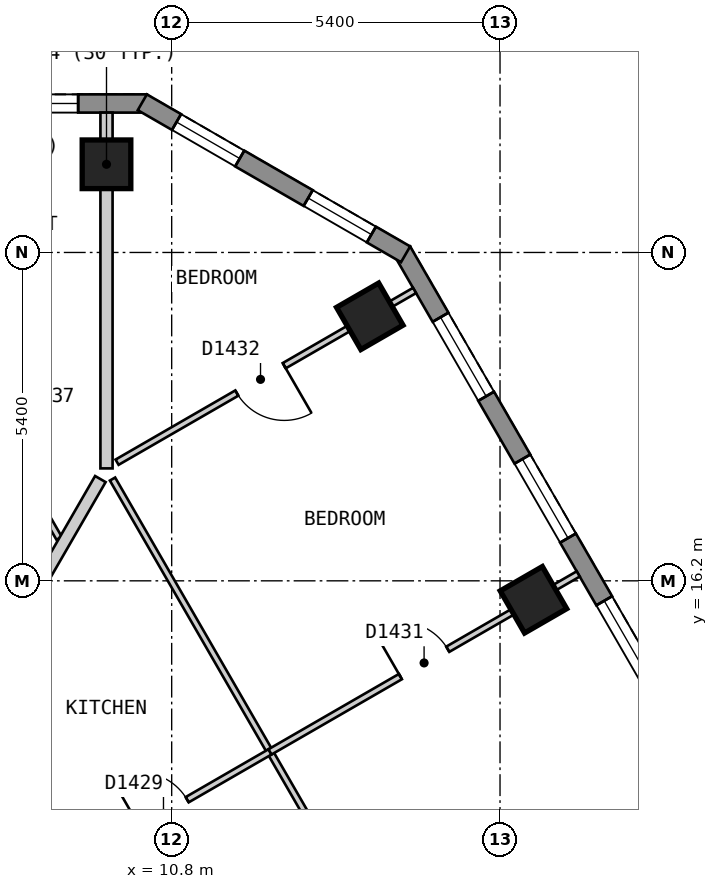
"""IFC4 building model, lengths in metres.
Left out: names, types, materials, properties, quantities, classifications, styles, units other than length and angle.
Written with IfcOpenShell. Run it as: python <this file> out.ifc"""

import sys

from ifc_helpers import new_model, si_unit, direction, frame, frame_2d, origin, origin_2d, place, context, subcontext, project, spatial, polyline, rectangle, outline, extrude, element, fill, save


model = new_model("IFC4")
c1 = context("Model", 3, precision=1e-05, world=origin(), true_north=direction((0.0, 1.0)))
c2 = subcontext(c1, "Body", "Model", "MODEL_VIEW")
j1 = project(units=[si_unit("LENGTHUNIT", "METRE"), si_unit("PLANEANGLEUNIT", "RADIAN")], contexts=[c1])
p1 = place(None, origin())
s1 = spatial("IfcSite", under=j1, at=p1, CompositionType="ELEMENT")
p2 = place(p1, origin())
s2 = spatial("IfcBuilding", under=s1, at=p2, CompositionType="ELEMENT")
p3 = place(p2, frame((0.0, 0.0, 172.2)))
s3 = spatial("IfcBuildingStorey", under=s2, at=p3, CompositionType="ELEMENT", Elevation=172.2)
for number, where, z_axis, x_axis in (
    (1, (9.728, 23.05, 0.0), (0.0, 0.0, 1.0), (-1.0, 0.0, 0.0)),
    (2, (16.75, 15.888, 0.0), (0.0, 0.0, 1.0), (-0.5, 0.866, 0.0)),
    (3, (14.058, 20.55, 0.0), (0.0, 0.0, 1.0), (-0.5, 0.866, 0.0)),
):
    element("IfcColumn", number, at=place(p3, frame(where, z_axis=z_axis, x_axis=x_axis)), inside=s3, PredefinedType="COLUMN", context=c2, shape_type="SweptSolid", body=[
        extrude(rectangle(XDim=0.8, YDim=0.8, at=origin_2d()), origin(), (0.0, 0.0, 1.0), 3.0),
    ])
p4 = place(p3, frame((10.392, 24.05, 0.0), z_axis=(0.0, 0.0, 1.0), x_axis=(-1.0, 0.0, 0.0)))
e4 = element("IfcWall", 4, at=p4, inside=s3, PredefinedType="SOLIDWALL", context=c2, shape_type="SweptSolid", body=[
    extrude(outline(polyline([(0.0, -0.15), (20.784, -0.15), (20.704, 0.15), (0.08, 0.15), (0.0, -0.15)])), origin(), (0.0, 0.0, 1.0), 2.7),
])
p5 = place(p4, frame((1.13, 0.0, 0.15)))
e5 = element("IfcOpeningElement", 5, at=p5, cuts=e4, PredefinedType="OPENING", context=c2, shape_type="SweptSolid", body=[
    extrude(rectangle(XDim=1.5, YDim=2.1, at=frame_2d((0.75, 1.05))), frame((0.0, 0.16, 0.0), z_axis=(0.0, -1.0, 0.0), x_axis=(1.0, 0.0, 0.0)), (0.0, 0.0, 1.0), 0.32),
])
p6 = place(p4, frame((3.562, 0.0, 0.15)))
e6 = element("IfcOpeningElement", 6, at=p6, cuts=e4, PredefinedType="OPENING", context=c2, shape_type="SweptSolid", body=[
    extrude(rectangle(XDim=1.5, YDim=2.1, at=frame_2d((0.75, 1.05))), frame((0.0, 0.16, 0.0), z_axis=(0.0, -1.0, 0.0), x_axis=(1.0, 0.0, 0.0)), (0.0, 0.0, 1.0), 0.32),
])
p7 = place(p4, frame((5.994, 0.0, 0.15)))
e7 = element("IfcOpeningElement", 7, at=p7, cuts=e4, PredefinedType="OPENING", context=c2, shape_type="SweptSolid", body=[
    extrude(rectangle(XDim=1.5, YDim=2.1, at=frame_2d((0.75, 1.05))), frame((0.0, 0.16, 0.0), z_axis=(0.0, -1.0, 0.0), x_axis=(1.0, 0.0, 0.0)), (0.0, 0.0, 1.0), 0.32),
])
p8 = place(p4, frame((8.426, 0.0, 0.15)))
e8 = element("IfcOpeningElement", 8, at=p8, cuts=e4, PredefinedType="OPENING", context=c2, shape_type="SweptSolid", body=[
    extrude(rectangle(XDim=1.5, YDim=2.1, at=frame_2d((0.75, 1.05))), frame((0.0, 0.16, 0.0), z_axis=(0.0, -1.0, 0.0), x_axis=(1.0, 0.0, 0.0)), (0.0, 0.0, 1.0), 0.32),
])
p9 = place(p4, frame((10.858, 0.0, 0.15)))
e9 = element("IfcOpeningElement", 9, at=p9, cuts=e4, PredefinedType="OPENING", context=c2, shape_type="SweptSolid", body=[
    extrude(rectangle(XDim=1.5, YDim=2.1, at=frame_2d((0.75, 1.05))), frame((0.0, 0.16, 0.0), z_axis=(0.0, -1.0, 0.0), x_axis=(1.0, 0.0, 0.0)), (0.0, 0.0, 1.0), 0.32),
])
p10 = place(p4, frame((13.29, 0.0, 0.15)))
e10 = element("IfcOpeningElement", 10, at=p10, cuts=e4, PredefinedType="OPENING", context=c2, shape_type="SweptSolid", body=[
    extrude(rectangle(XDim=1.5, YDim=2.1, at=frame_2d((0.75, 1.05))), frame((0.0, 0.16, 0.0), z_axis=(0.0, -1.0, 0.0), x_axis=(1.0, 0.0, 0.0)), (0.0, 0.0, 1.0), 0.32),
])
p11 = place(p4, frame((15.722, 0.0, 0.15)))
e11 = element("IfcOpeningElement", 11, at=p11, cuts=e4, PredefinedType="OPENING", context=c2, shape_type="SweptSolid", body=[
    extrude(rectangle(XDim=1.5, YDim=2.1, at=frame_2d((0.75, 1.05))), frame((0.0, 0.16, 0.0), z_axis=(0.0, -1.0, 0.0), x_axis=(1.0, 0.0, 0.0)), (0.0, 0.0, 1.0), 0.32),
])
p12 = place(p4, frame((18.154, 0.0, 0.15)))
e12 = element("IfcOpeningElement", 12, at=p12, cuts=e4, PredefinedType="OPENING", context=c2, shape_type="SweptSolid", body=[
    extrude(rectangle(XDim=1.5, YDim=2.1, at=frame_2d((0.75, 1.05))), frame((0.0, 0.16, 0.0), z_axis=(0.0, -1.0, 0.0), x_axis=(1.0, 0.0, 0.0)), (0.0, 0.0, 1.0), 0.32),
])
p13 = place(p3, frame((26.024, 1.825, 0.0), z_axis=(0.0, 0.0, 1.0), x_axis=(-0.500010537973, 0.866019319597, 0.0)))
e13 = element("IfcWall", 13, at=p13, inside=s3, PredefinedType="SOLIDWALL", context=c2, shape_type="SweptSolid", body=[
    extrude(outline(polyline([(0.0, -0.15), (22.863, -0.15), (22.783, 0.15), (0.08, 0.15), (0.0, -0.15)])), origin(), (0.0, 0.0, 1.0), 2.7),
])
p14 = place(p13, frame((1.259, 0.0, 0.15)))
e14 = element("IfcOpeningElement", 14, at=p14, cuts=e13, PredefinedType="OPENING", context=c2, shape_type="SweptSolid", body=[
    extrude(rectangle(XDim=1.5, YDim=2.1, at=frame_2d((0.75, 1.05))), frame((0.0, 0.16, 0.0), z_axis=(0.0, -1.0, 0.0), x_axis=(1.0, 0.0, 0.0)), (0.0, 0.0, 1.0), 0.32),
])
p15 = place(p13, frame((3.952, 0.0, 0.15)))
e15 = element("IfcOpeningElement", 15, at=p15, cuts=e13, PredefinedType="OPENING", context=c2, shape_type="SweptSolid", body=[
    extrude(rectangle(XDim=1.5, YDim=2.1, at=frame_2d((0.75, 1.05))), frame((0.0, 0.16, 0.0), z_axis=(0.0, -1.0, 0.0), x_axis=(1.0, 0.0, 0.0)), (0.0, 0.0, 1.0), 0.32),
])
p16 = place(p13, frame((6.644, 0.0, 0.15)))
e16 = element("IfcOpeningElement", 16, at=p16, cuts=e13, PredefinedType="OPENING", context=c2, shape_type="SweptSolid", body=[
    extrude(rectangle(XDim=1.5, YDim=2.1, at=frame_2d((0.75, 1.05))), frame((0.0, 0.16, 0.0), z_axis=(0.0, -1.0, 0.0), x_axis=(1.0, 0.0, 0.0)), (0.0, 0.0, 1.0), 0.32),
])
p17 = place(p13, frame((9.335, 0.0, 0.15)))
e17 = element("IfcOpeningElement", 17, at=p17, cuts=e13, PredefinedType="OPENING", context=c2, shape_type="SweptSolid", body=[
    extrude(rectangle(XDim=1.5, YDim=2.1, at=frame_2d((0.75, 1.05))), frame((0.0, 0.16, 0.0), z_axis=(0.0, -1.0, 0.0), x_axis=(1.0, 0.0, 0.0)), (0.0, 0.0, 1.0), 0.32),
])
p18 = place(p13, frame((12.028, 0.0, 0.15)))
e18 = element("IfcOpeningElement", 18, at=p18, cuts=e13, PredefinedType="OPENING", context=c2, shape_type="SweptSolid", body=[
    extrude(rectangle(XDim=1.5, YDim=2.1, at=frame_2d((0.75, 1.05))), frame((0.0, 0.16, 0.0), z_axis=(0.0, -1.0, 0.0), x_axis=(1.0, 0.0, 0.0)), (0.0, 0.0, 1.0), 0.32),
])
p19 = place(p13, frame((14.72, 0.0, 0.15)))
e19 = element("IfcOpeningElement", 19, at=p19, cuts=e13, PredefinedType="OPENING", context=c2, shape_type="SweptSolid", body=[
    extrude(rectangle(XDim=1.5, YDim=2.1, at=frame_2d((0.75, 1.05))), frame((0.0, 0.16, 0.0), z_axis=(0.0, -1.0, 0.0), x_axis=(1.0, 0.0, 0.0)), (0.0, 0.0, 1.0), 0.32),
])
p20 = place(p13, frame((17.411, 0.0, 0.15)))
e20 = element("IfcOpeningElement", 20, at=p20, cuts=e13, PredefinedType="OPENING", context=c2, shape_type="SweptSolid", body=[
    extrude(rectangle(XDim=1.5, YDim=2.1, at=frame_2d((0.75, 1.05))), frame((0.0, 0.16, 0.0), z_axis=(0.0, -1.0, 0.0), x_axis=(1.0, 0.0, 0.0)), (0.0, 0.0, 1.0), 0.32),
])
p21 = place(p13, frame((20.104, 0.0, 0.15)))
e21 = element("IfcOpeningElement", 21, at=p21, cuts=e13, PredefinedType="OPENING", context=c2, shape_type="SweptSolid", body=[
    extrude(rectangle(XDim=1.5, YDim=2.1, at=frame_2d((0.75, 1.05))), frame((0.0, 0.16, 0.0), z_axis=(0.0, -1.0, 0.0), x_axis=(1.0, 0.0, 0.0)), (0.0, 0.0, 1.0), 0.32),
])
p22 = place(p3, frame((14.647, 21.57, 0.0), z_axis=(0.0, 0.0, 1.0), x_axis=(-0.866022959057, 0.500004234368, 0.0)))
e22 = element("IfcWall", 22, at=p22, inside=s3, PredefinedType="SOLIDWALL", context=c2, shape_type="SweptSolid", body=[
    extrude(outline(polyline([(0.0, -0.15), (5.0, -0.15), (4.92, 0.15), (0.08, 0.15), (0.0, -0.15)])), origin(), (0.0, 0.0, 1.0), 2.7),
])
p23 = place(p22, frame((0.65, 0.0, 0.15)))
e23 = element("IfcOpeningElement", 23, at=p23, cuts=e22, PredefinedType="OPENING", context=c2, shape_type="SweptSolid", body=[
    extrude(rectangle(XDim=1.2, YDim=2.1, at=frame_2d((0.6, 1.05))), frame((0.0, 0.16, 0.0), z_axis=(0.0, -1.0, 0.0), x_axis=(1.0, 0.0, 0.0)), (0.0, 0.0, 1.0), 0.32),
])
p24 = place(p22, frame((3.15, 0.0, 0.15)))
e24 = element("IfcOpeningElement", 24, at=p24, cuts=e22, PredefinedType="OPENING", context=c2, shape_type="SweptSolid", body=[
    extrude(rectangle(XDim=1.2, YDim=2.1, at=frame_2d((0.6, 1.05))), frame((0.0, 0.16, 0.0), z_axis=(0.0, -1.0, 0.0), x_axis=(1.0, 0.0, 0.0)), (0.0, 0.0, 1.0), 0.32),
])
p25 = place(p3, frame((5.485, 17.3, 0.0), z_axis=(0.0, 0.0, 1.0), x_axis=(0.499965832213, -0.866045129667, 0.0)))
e25 = element("IfcWall", 25, at=p25, inside=s3, PredefinedType="PARTITIONING", context=c2, shape_type="SweptSolid", body=[
    extrude(rectangle(XDim=10.739, YDim=0.2, at=frame_2d((5.369, 0.0))), origin(), (0.0, 0.0, 1.0), 2.7),
])
p26 = place(p25, frame((9.048, 0.0, 0.0)))
e26 = element("IfcOpeningElement", 26, at=p26, cuts=e25, PredefinedType="OPENING", context=c2, shape_type="SweptSolid", body=[
    extrude(rectangle(XDim=1.0, YDim=2.1, at=frame_2d((0.5, 1.05))), frame((0.0, 0.11, 0.0), z_axis=(0.0, -1.0, 0.0), x_axis=(1.0, 0.0, 0.0)), (0.0, 0.0, 1.0), 0.22),
])
p27 = place(p25, frame((0.161, 0.0, 0.0)))
e27 = element("IfcOpeningElement", 27, at=p27, cuts=e25, PredefinedType="OPENING", context=c2, shape_type="SweptSolid", body=[
    extrude(rectangle(XDim=0.9, YDim=2.1, at=frame_2d((0.45, 1.05))), frame((0.0, 0.11, 0.0), z_axis=(0.0, -1.0, 0.0), x_axis=(1.0, 0.0, 0.0)), (0.0, 0.0, 1.0), 0.22),
])
p28 = place(p3, frame((7.073, 20.15, 0.0), z_axis=(0.0, 0.0, 1.0), x_axis=(0.499917691695, -0.866072919292, 0.0)))
e28 = element("IfcWall", 28, at=p28, inside=s3, PredefinedType="PARTITIONING", context=c2, shape_type="SweptSolid", body=[
    extrude(rectangle(XDim=3.753, YDim=0.1, at=frame_2d((1.876, 0.0))), origin(), (0.0, 0.0, 1.0), 2.7),
])
p29 = place(p28, frame((1.432, 0.0, 0.0)))
e29 = element("IfcOpeningElement", 29, at=p29, cuts=e28, PredefinedType="OPENING", context=c2, shape_type="SweptSolid", body=[
    extrude(rectangle(XDim=0.9, YDim=2.1, at=frame_2d((0.45, 1.05))), frame((0.0, 0.06, 0.0), z_axis=(0.0, -1.0, 0.0), x_axis=(1.0, 0.0, 0.0)), (0.0, 0.0, 1.0), 0.12),
])
p30 = place(p3, frame((9.827, 17.874, 0.0), z_axis=(0.0, 0.0, 1.0), x_axis=(0.499962189394, -0.866047232647, 0.0)))
e30 = element("IfcWall", 30, at=p30, inside=s3, PredefinedType="PARTITIONING", context=c2, shape_type="SweptSolid", body=[
    extrude(rectangle(XDim=11.401, YDim=0.1, at=frame_2d((5.701, 0.0))), origin(), (0.0, 0.0, 1.0), 2.7),
])
p31 = place(p30, frame((7.433, 0.0, 0.0)))
e31 = element("IfcOpeningElement", 31, at=p31, cuts=e30, PredefinedType="OPENING", context=c2, shape_type="SweptSolid", body=[
    extrude(rectangle(XDim=0.9, YDim=2.1, at=frame_2d((0.45, 1.05))), frame((0.0, 0.06, 0.0), z_axis=(0.0, -1.0, 0.0), x_axis=(1.0, 0.0, 0.0)), (0.0, 0.0, 1.0), 0.12),
])
p32 = place(p3, frame((8.999, 11.413, 0.0), z_axis=(0.0, 0.0, 1.0), x_axis=(0.865969252911, 0.500097243556, 0.0)))
e32 = element("IfcWall", 32, at=p32, inside=s3, PredefinedType="PARTITIONING", context=c2, shape_type="SweptSolid", body=[
    extrude(rectangle(XDim=3.947, YDim=0.1, at=frame_2d((1.974, 0.0))), origin(), (0.0, 0.0, 1.0), 2.7),
])
p33 = place(p32, frame((1.474, 0.0, 0.0)))
e33 = element("IfcOpeningElement", 33, at=p33, cuts=e32, PredefinedType="OPENING", context=c2, shape_type="SweptSolid", body=[
    extrude(rectangle(XDim=0.9, YDim=2.1, at=frame_2d((0.45, 1.05))), frame((0.0, 0.06, 0.0), z_axis=(0.0, -1.0, 0.0), x_axis=(1.0, 0.0, 0.0)), (0.0, 0.0, 1.0), 0.12),
])
p34 = place(p3, frame((9.902, 18.151, 0.0), z_axis=(0.0, 0.0, 1.0), x_axis=(0.866032278734, 0.499988092049, 0.0)))
e34 = element("IfcWall", 34, at=p34, inside=s3, PredefinedType="PARTITIONING", context=c2, shape_type="SweptSolid", body=[
    extrude(rectangle(XDim=5.649, YDim=0.1, at=frame_2d((2.824, 0.0))), origin(), (0.0, 0.0, 1.0), 2.7),
])
p35 = place(p34, frame((2.274, 0.0, 0.0)))
e35 = element("IfcOpeningElement", 35, at=p35, cuts=e34, PredefinedType="OPENING", context=c2, shape_type="SweptSolid", body=[
    extrude(rectangle(XDim=0.9, YDim=2.1, at=frame_2d((0.45, 1.05))), frame((0.0, 0.06, 0.0), z_axis=(0.0, -1.0, 0.0), x_axis=(1.0, 0.0, 0.0)), (0.0, 0.0, 1.0), 0.12),
])
p36 = place(p3, frame((7.448, 14.1, 0.0), z_axis=(0.0, 0.0, 1.0), x_axis=(0.500013426303, 0.866017651966, 0.0)))
e36 = element("IfcWall", 36, at=p36, inside=s3, PredefinedType="PARTITIONING", context=c2, shape_type="SweptSolid", body=[
    extrude(rectangle(XDim=4.358, YDim=0.2, at=frame_2d((2.179, 0.0))), origin(), (0.0, 0.0, 1.0), 2.7),
])
p37 = place(p3, frame((9.728, 18.049, 0.0), z_axis=(0.0, 0.0, 1.0), x_axis=(0.0, 1.0, 0.0)))
e37 = element("IfcWall", 37, at=p37, inside=s3, PredefinedType="PARTITIONING", context=c2, shape_type="SweptSolid", body=[
    extrude(rectangle(XDim=5.851, YDim=0.2, at=frame_2d((2.925, 0.0))), origin(), (0.0, 0.0, 1.0), 2.7),
])
p38 = place(p3, frame((12.417, 13.387, 0.0), z_axis=(0.0, 0.0, 1.0), x_axis=(0.866070981966, 0.499921047963, 0.0)))
e38 = element("IfcWall", 38, at=p38, inside=s3, PredefinedType="PARTITIONING", context=c2, shape_type="SweptSolid", body=[
    extrude(rectangle(XDim=5.853, YDim=0.1, at=frame_2d((2.927, 0.0))), origin(), (0.0, 0.0, 1.0), 2.7),
])
p39 = place(p38, frame((2.476, 0.0, 0.0)))
e39 = element("IfcOpeningElement", 39, at=p39, cuts=e38, PredefinedType="OPENING", context=c2, shape_type="SweptSolid", body=[
    extrude(rectangle(XDim=0.9, YDim=2.1, at=frame_2d((0.45, 1.05))), frame((0.0, 0.06, 0.0), z_axis=(0.0, -1.0, 0.0), x_axis=(1.0, 0.0, 0.0)), (0.0, 0.0, 1.0), 0.12),
])
p40 = place(p5, origin())
e40 = element("IfcWindow", 40, at=p40, inside=s3, PartitioningType="SINGLE_PANEL", PredefinedType="WINDOW", context=c2, shape_type="SweptSolid", body=[
    extrude(rectangle(XDim=1.5, YDim=2.1, at=frame_2d((0.75, 1.05))), frame((0.0, 0.03, 0.0), z_axis=(0.0, -1.0, 0.0), x_axis=(1.0, 0.0, 0.0)), (0.0, 0.0, 1.0), 0.06),
])
fill(e5, e40)
p41 = place(p19, origin())
e41 = element("IfcWindow", 41, at=p41, inside=s3, PartitioningType="SINGLE_PANEL", PredefinedType="WINDOW", context=c2, shape_type="SweptSolid", body=[
    extrude(rectangle(XDim=1.5, YDim=2.1, at=frame_2d((0.75, 1.05))), frame((0.0, 0.03, 0.0), z_axis=(0.0, -1.0, 0.0), x_axis=(1.0, 0.0, 0.0)), (0.0, 0.0, 1.0), 0.06),
])
fill(e19, e41)
p42 = place(p20, origin())
e42 = element("IfcWindow", 42, at=p42, inside=s3, PartitioningType="SINGLE_PANEL", PredefinedType="WINDOW", context=c2, shape_type="SweptSolid", body=[
    extrude(rectangle(XDim=1.5, YDim=2.1, at=frame_2d((0.75, 1.05))), frame((0.0, 0.03, 0.0), z_axis=(0.0, -1.0, 0.0), x_axis=(1.0, 0.0, 0.0)), (0.0, 0.0, 1.0), 0.06),
])
fill(e20, e42)
p43 = place(p21, origin())
e43 = element("IfcWindow", 43, at=p43, inside=s3, PartitioningType="SINGLE_PANEL", PredefinedType="WINDOW", context=c2, shape_type="SweptSolid", body=[
    extrude(rectangle(XDim=1.5, YDim=2.1, at=frame_2d((0.75, 1.05))), frame((0.0, 0.03, 0.0), z_axis=(0.0, -1.0, 0.0), x_axis=(1.0, 0.0, 0.0)), (0.0, 0.0, 1.0), 0.06),
])
fill(e21, e43)
p44 = place(p23, origin())
e44 = element("IfcWindow", 44, at=p44, inside=s3, PartitioningType="SINGLE_PANEL", PredefinedType="WINDOW", context=c2, shape_type="SweptSolid", body=[
    extrude(rectangle(XDim=1.2, YDim=2.1, at=frame_2d((0.6, 1.05))), frame((0.0, 0.03, 0.0), z_axis=(0.0, -1.0, 0.0), x_axis=(1.0, 0.0, 0.0)), (0.0, 0.0, 1.0), 0.06),
])
fill(e23, e44)
p45 = place(p24, origin())
e45 = element("IfcWindow", 45, at=p45, inside=s3, PartitioningType="SINGLE_PANEL", PredefinedType="WINDOW", context=c2, shape_type="SweptSolid", body=[
    extrude(rectangle(XDim=1.2, YDim=2.1, at=frame_2d((0.6, 1.05))), frame((0.0, 0.03, 0.0), z_axis=(0.0, -1.0, 0.0), x_axis=(1.0, 0.0, 0.0)), (0.0, 0.0, 1.0), 0.06),
])
fill(e24, e45)
p46 = place(p33, origin())
e46 = element("IfcDoor", 46, at=p46, inside=s3, OperationType="SINGLE_SWING_LEFT", PredefinedType="DOOR", context=c2, shape_type="SweptSolid", body=[
    extrude(rectangle(XDim=0.9, YDim=2.1, at=frame_2d((0.45, 1.05))), frame((0.0, 0.025, 0.0), z_axis=(0.0, -1.0, 0.0), x_axis=(1.0, 0.0, 0.0)), (0.0, 0.0, 1.0), 0.05),
])
fill(e33, e46)
p47 = place(p39, origin())
e47 = element("IfcDoor", 47, at=p47, inside=s3, OperationType="SINGLE_SWING_LEFT", PredefinedType="DOOR", context=c2, shape_type="SweptSolid", body=[
    extrude(rectangle(XDim=0.9, YDim=2.1, at=frame_2d((0.45, 1.05))), frame((0.0, 0.025, 0.0), z_axis=(0.0, -1.0, 0.0), x_axis=(1.0, 0.0, 0.0)), (0.0, 0.0, 1.0), 0.05),
])
fill(e39, e47)
p48 = place(p35, origin())
e48 = element("IfcDoor", 48, at=p48, inside=s3, OperationType="SINGLE_SWING_RIGHT", PredefinedType="DOOR", context=c2, shape_type="SweptSolid", body=[
    extrude(rectangle(XDim=0.9, YDim=2.1, at=frame_2d((0.45, 1.05))), frame((0.0, 0.025, 0.0), z_axis=(0.0, -1.0, 0.0), x_axis=(1.0, 0.0, 0.0)), (0.0, 0.0, 1.0), 0.05),
])
fill(e35, e48)
save(model, sys.argv[1])
